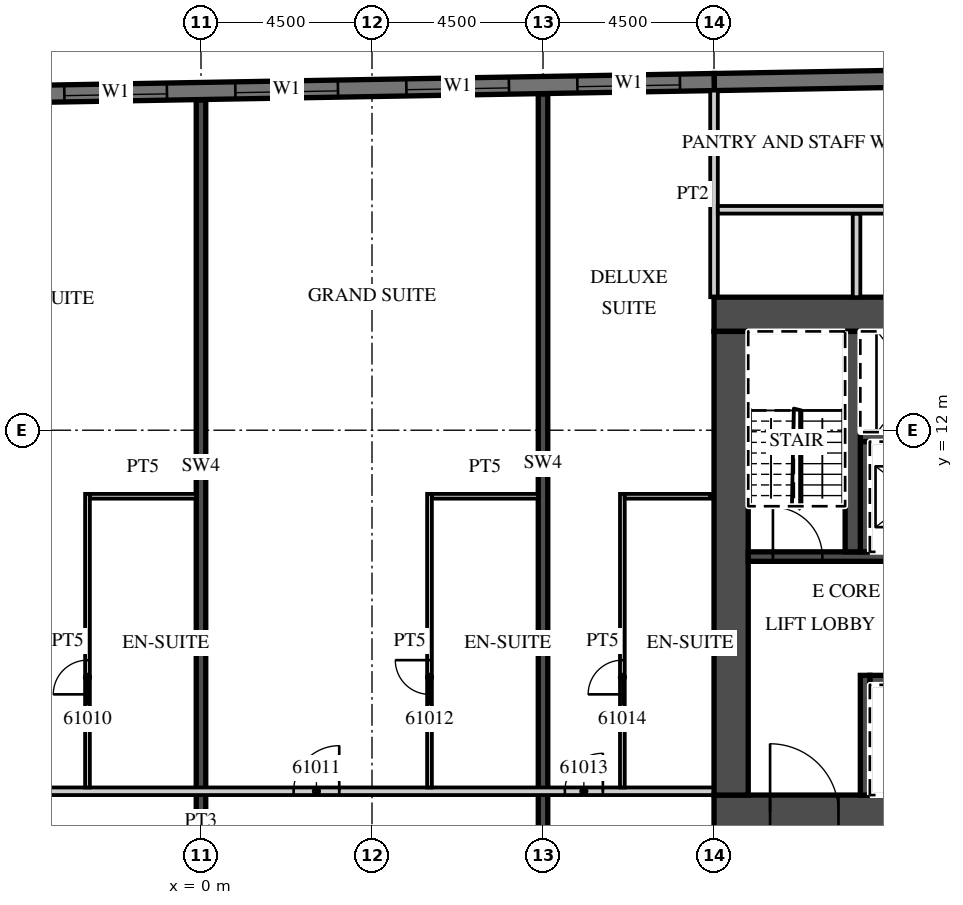
"""IFC4 building model, lengths in metres.
Left out: names, types, materials, properties, quantities, classifications, styles, units other than length and angle.
Written with IfcOpenShell. Run it as: python <this file> out.ifc"""

import sys

from ifc_helpers import new_model, si_unit, direction, frame, frame_2d, origin, place, context, subcontext, project, spatial, rectangle, extrude, element, fill, save


model = new_model("IFC4")
c1 = context("Model", 3, precision=1e-05, world=origin(), true_north=direction((0.0, 1.0)))
c2 = subcontext(c1, "Body", "Model", "MODEL_VIEW")
j1 = project(units=[si_unit("LENGTHUNIT", "METRE"), si_unit("PLANEANGLEUNIT", "RADIAN")], contexts=[c1])
p1 = place(None, origin())
s1 = spatial("IfcSite", under=j1, at=p1, CompositionType="ELEMENT")
p2 = place(p1, origin())
s2 = spatial("IfcBuilding", under=s1, at=p2, CompositionType="ELEMENT")
p3 = place(p2, frame((0.0, 0.0, 247.4)))
s3 = spatial("IfcBuildingStorey", under=s2, at=p3, CompositionType="ELEMENT", Elevation=247.4)
p4 = place(p3, frame((0.0, 1.4, 0.0), z_axis=(0.0, 0.0, 1.0), x_axis=(0.0, 1.0, 0.0)))
e1 = element("IfcWall", 1, at=p4, inside=s3, PredefinedType="SHEAR", context=c2, shape_type="SweptSolid", body=[
    extrude(rectangle(XDim=19.289, YDim=0.25, at=frame_2d((9.644, 0.0))), origin(), (0.0, 0.0, 1.0), 3.3),
])
p5 = place(p3, frame((9.0, 1.4, 0.0), z_axis=(0.0, 0.0, 1.0), x_axis=(0.0, 1.0, 0.0)))
e2 = element("IfcWall", 2, at=p5, inside=s3, PredefinedType="SHEAR", context=c2, shape_type="SweptSolid", body=[
    extrude(rectangle(XDim=19.446, YDim=0.25, at=frame_2d((9.723, 0.0))), origin(), (0.0, 0.0, 1.0), 3.3),
])
p6 = place(p3, frame((31.504, 21.476, 0.0), z_axis=(0.0, 0.0, 1.0), x_axis=(-0.999847677887, -0.017453395744, 0.0)))
e3 = element("IfcWall", 3, at=p6, inside=s3, PredefinedType="SOLIDWALL", context=c2, shape_type="SweptSolid", body=[
    extrude(rectangle(XDim=18.003, YDim=0.45, at=frame_2d((9.001, 0.0))), origin(), (0.0, 0.0, 1.0), 3.02),
])
p7 = place(p3, frame((13.504, 21.161, 0.0), z_axis=(0.0, 0.0, 1.0), x_axis=(-0.999847763257, -0.017448504532, 0.0)))
e4 = element("IfcWall", 4, at=p7, inside=s3, PredefinedType="SOLIDWALL", context=c2, shape_type="SweptSolid", body=[
    extrude(rectangle(XDim=46.859, YDim=0.45, at=frame_2d((23.43, 0.0))), origin(), (0.0, 0.0, 1.0), 3.02),
])
p8 = place(p7, frame((0.9, 0.0, 0.45)))
e5 = element("IfcOpeningElement", 5, at=p8, cuts=e4, PredefinedType="OPENING", context=c2, shape_type="SweptSolid", body=[
    extrude(rectangle(XDim=2.7, YDim=2.25, at=frame_2d((1.35, 1.125))), frame((0.0, 0.235, 0.0), z_axis=(0.0, -1.0, 0.0), x_axis=(1.0, 0.0, 0.0)), (0.0, 0.0, 1.0), 0.47),
])
p9 = place(p7, frame((5.401, 0.0, 0.45)))
e6 = element("IfcOpeningElement", 6, at=p9, cuts=e4, PredefinedType="OPENING", context=c2, shape_type="SweptSolid", body=[
    extrude(rectangle(XDim=2.7, YDim=2.25, at=frame_2d((1.35, 1.125))), frame((0.0, 0.235, 0.0), z_axis=(0.0, -1.0, 0.0), x_axis=(1.0, 0.0, 0.0)), (0.0, 0.0, 1.0), 0.47),
])
p10 = place(p7, frame((9.902, 0.0, 0.45)))
e7 = element("IfcOpeningElement", 7, at=p10, cuts=e4, PredefinedType="OPENING", context=c2, shape_type="SweptSolid", body=[
    extrude(rectangle(XDim=2.7, YDim=2.25, at=frame_2d((1.35, 1.125))), frame((0.0, 0.235, 0.0), z_axis=(0.0, -1.0, 0.0), x_axis=(1.0, 0.0, 0.0)), (0.0, 0.0, 1.0), 0.47),
])
p11 = place(p7, frame((14.402, 0.0, 0.45)))
e8 = element("IfcOpeningElement", 8, at=p11, cuts=e4, PredefinedType="OPENING", context=c2, shape_type="SweptSolid", body=[
    extrude(rectangle(XDim=2.7, YDim=2.25, at=frame_2d((1.35, 1.125))), frame((0.0, 0.235, 0.0), z_axis=(0.0, -1.0, 0.0), x_axis=(1.0, 0.0, 0.0)), (0.0, 0.0, 1.0), 0.47),
])
p12 = place(p7, frame((18.903, 0.0, 0.45)))
e9 = element("IfcOpeningElement", 9, at=p12, cuts=e4, PredefinedType="OPENING", context=c2, shape_type="SweptSolid", body=[
    extrude(rectangle(XDim=2.7, YDim=2.25, at=frame_2d((1.35, 1.125))), frame((0.0, 0.235, 0.0), z_axis=(0.0, -1.0, 0.0), x_axis=(1.0, 0.0, 0.0)), (0.0, 0.0, 1.0), 0.47),
])
p13 = place(p7, frame((23.404, 0.0, 0.45)))
e10 = element("IfcOpeningElement", 10, at=p13, cuts=e4, PredefinedType="OPENING", context=c2, shape_type="SweptSolid", body=[
    extrude(rectangle(XDim=2.7, YDim=2.25, at=frame_2d((1.35, 1.125))), frame((0.0, 0.235, 0.0), z_axis=(0.0, -1.0, 0.0), x_axis=(1.0, 0.0, 0.0)), (0.0, 0.0, 1.0), 0.47),
])
p14 = place(p7, frame((27.904, 0.0, 0.45)))
e11 = element("IfcOpeningElement", 11, at=p14, cuts=e4, PredefinedType="OPENING", context=c2, shape_type="SweptSolid", body=[
    extrude(rectangle(XDim=2.7, YDim=2.25, at=frame_2d((1.35, 1.125))), frame((0.0, 0.235, 0.0), z_axis=(0.0, -1.0, 0.0), x_axis=(1.0, 0.0, 0.0)), (0.0, 0.0, 1.0), 0.47),
])
p15 = place(p7, frame((32.405, 0.0, 0.45)))
e12 = element("IfcOpeningElement", 12, at=p15, cuts=e4, PredefinedType="OPENING", context=c2, shape_type="SweptSolid", body=[
    extrude(rectangle(XDim=2.7, YDim=2.25, at=frame_2d((1.35, 1.125))), frame((0.0, 0.235, 0.0), z_axis=(0.0, -1.0, 0.0), x_axis=(1.0, 0.0, 0.0)), (0.0, 0.0, 1.0), 0.47),
])
p16 = place(p7, frame((36.906, 0.0, 0.45)))
e13 = element("IfcOpeningElement", 13, at=p16, cuts=e4, PredefinedType="OPENING", context=c2, shape_type="SweptSolid", body=[
    extrude(rectangle(XDim=2.7, YDim=2.25, at=frame_2d((1.35, 1.125))), frame((0.0, 0.235, 0.0), z_axis=(0.0, -1.0, 0.0), x_axis=(1.0, 0.0, 0.0)), (0.0, 0.0, 1.0), 0.47),
])
p17 = place(p7, frame((41.406, 0.0, 0.45)))
e14 = element("IfcOpeningElement", 14, at=p17, cuts=e4, PredefinedType="OPENING", context=c2, shape_type="SweptSolid", body=[
    extrude(rectangle(XDim=2.7, YDim=2.25, at=frame_2d((1.35, 1.125))), frame((0.0, 0.235, 0.0), z_axis=(0.0, -1.0, 0.0), x_axis=(1.0, 0.0, 0.0)), (0.0, 0.0, 1.0), 0.47),
])
p18 = place(p3, frame((13.5, 15.5, 0.0), z_axis=(0.0, 0.0, 1.0), x_axis=(0.0, 1.0, 0.0)))
e15 = element("IfcWall", 15, at=p18, inside=s3, PredefinedType="PARTITIONING", context=c2, shape_type="SweptSolid", body=[
    extrude(rectangle(XDim=5.436, YDim=0.2, at=frame_2d((2.718, 0.0))), origin(), (0.0, 0.0, 1.0), 3.02),
])
p19 = place(p3, frame((-13.5, 2.5, 0.0), z_axis=(0.0, 0.0, 1.0), x_axis=(1.0, 0.0, 0.0)))
e16 = element("IfcWall", 16, at=p19, inside=s3, PredefinedType="PARTITIONING", context=c2, shape_type="SweptSolid", body=[
    extrude(rectangle(XDim=27.0, YDim=0.2, at=frame_2d((13.5, 0.0))), origin(), (0.0, 0.0, 1.0), 3.02),
])
p20 = place(p19, frame((0.575, 0.0, 0.0)))
e17 = element("IfcOpeningElement", 17, at=p20, cuts=e16, PredefinedType="OPENING", context=c2, shape_type="SweptSolid", body=[
    extrude(rectangle(XDim=1.0, YDim=2.1, at=frame_2d((0.5, 1.05))), frame((0.0, 0.11, 0.0), z_axis=(0.0, -1.0, 0.0), x_axis=(1.0, 0.0, 0.0)), (0.0, 0.0, 1.0), 0.22),
])
p21 = place(p19, frame((6.938, 0.0, 0.0)))
e18 = element("IfcOpeningElement", 18, at=p21, cuts=e16, PredefinedType="OPENING", context=c2, shape_type="SweptSolid", body=[
    extrude(rectangle(XDim=1.2, YDim=2.1, at=frame_2d((0.6, 1.05))), frame((0.0, 0.11, 0.0), z_axis=(0.0, -1.0, 0.0), x_axis=(1.0, 0.0, 0.0)), (0.0, 0.0, 1.0), 0.22),
])
p22 = place(p19, frame((15.938, 0.0, 0.0)))
e19 = element("IfcOpeningElement", 19, at=p22, cuts=e16, PredefinedType="OPENING", context=c2, shape_type="SweptSolid", body=[
    extrude(rectangle(XDim=1.2, YDim=2.1, at=frame_2d((0.6, 1.05))), frame((0.0, 0.11, 0.0), z_axis=(0.0, -1.0, 0.0), x_axis=(1.0, 0.0, 0.0)), (0.0, 0.0, 1.0), 0.22),
])
p23 = place(p19, frame((23.075, 0.0, 0.0)))
e20 = element("IfcOpeningElement", 20, at=p23, cuts=e16, PredefinedType="OPENING", context=c2, shape_type="SweptSolid", body=[
    extrude(rectangle(XDim=1.0, YDim=2.1, at=frame_2d((0.5, 1.05))), frame((0.0, 0.11, 0.0), z_axis=(0.0, -1.0, 0.0), x_axis=(1.0, 0.0, 0.0)), (0.0, 0.0, 1.0), 0.22),
])
p24 = place(p3, frame((-2.987, 2.6, 0.0), z_axis=(0.0, 0.0, 1.0), x_axis=(0.0, 1.0, 0.0)))
e21 = element("IfcWall", 21, at=p24, inside=s3, PredefinedType="PARTITIONING", context=c2, shape_type="SweptSolid", body=[
    extrude(rectangle(XDim=7.725, YDim=0.125, at=frame_2d((3.862, 0.0))), origin(), (0.0, 0.0, 1.0), 3.02),
])
p25 = place(p24, frame((2.45, 0.0, 0.0)))
e22 = element("IfcOpeningElement", 22, at=p25, cuts=e21, PredefinedType="OPENING", context=c2, shape_type="SweptSolid", body=[
    extrude(rectangle(XDim=0.9, YDim=2.1, at=frame_2d((0.45, 1.05))), frame((0.0, 0.073, 0.0), z_axis=(0.0, -1.0, 0.0), x_axis=(1.0, 0.0, 0.0)), (0.0, 0.0, 1.0), 0.145),
])
p26 = place(p3, frame((-2.925, 10.262, 0.0), z_axis=(0.0, 0.0, 1.0), x_axis=(1.0, 0.0, 0.0)))
e23 = element("IfcWall", 23, at=p26, inside=s3, PredefinedType="PARTITIONING", context=c2, shape_type="SweptSolid", body=[
    extrude(rectangle(XDim=2.8, YDim=0.125, at=frame_2d((1.4, 0.0))), origin(), (0.0, 0.0, 1.0), 3.02),
])
p27 = place(p3, frame((6.013, 2.6, 0.0), z_axis=(0.0, 0.0, 1.0), x_axis=(0.0, 1.0, 0.0)))
e24 = element("IfcWall", 24, at=p27, inside=s3, PredefinedType="PARTITIONING", context=c2, shape_type="SweptSolid", body=[
    extrude(rectangle(XDim=7.725, YDim=0.125, at=frame_2d((3.862, 0.0))), origin(), (0.0, 0.0, 1.0), 3.02),
])
p28 = place(p27, frame((2.45, 0.0, 0.0)))
e25 = element("IfcOpeningElement", 25, at=p28, cuts=e24, PredefinedType="OPENING", context=c2, shape_type="SweptSolid", body=[
    extrude(rectangle(XDim=0.9, YDim=2.1, at=frame_2d((0.45, 1.05))), frame((0.0, 0.073, 0.0), z_axis=(0.0, -1.0, 0.0), x_axis=(1.0, 0.0, 0.0)), (0.0, 0.0, 1.0), 0.145),
])
p29 = place(p3, frame((6.075, 10.262, 0.0), z_axis=(0.0, 0.0, 1.0), x_axis=(1.0, 0.0, 0.0)))
e26 = element("IfcWall", 26, at=p29, inside=s3, PredefinedType="PARTITIONING", context=c2, shape_type="SweptSolid", body=[
    extrude(rectangle(XDim=2.8, YDim=0.125, at=frame_2d((1.4, 0.0))), origin(), (0.0, 0.0, 1.0), 3.02),
])
p30 = place(p3, frame((11.088, 2.6, 0.0), z_axis=(0.0, 0.0, 1.0), x_axis=(0.0, 1.0, 0.0)))
e27 = element("IfcWall", 27, at=p30, inside=s3, PredefinedType="PARTITIONING", context=c2, shape_type="SweptSolid", body=[
    extrude(rectangle(XDim=7.725, YDim=0.125, at=frame_2d((3.862, 0.0))), origin(), (0.0, 0.0, 1.0), 3.02),
])
p31 = place(p30, frame((2.45, 0.0, 0.0)))
e28 = element("IfcOpeningElement", 28, at=p31, cuts=e27, PredefinedType="OPENING", context=c2, shape_type="SweptSolid", body=[
    extrude(rectangle(XDim=0.9, YDim=2.1, at=frame_2d((0.45, 1.05))), frame((0.0, 0.073, 0.0), z_axis=(0.0, -1.0, 0.0), x_axis=(1.0, 0.0, 0.0)), (0.0, 0.0, 1.0), 0.145),
])
p32 = place(p3, frame((11.15, 10.262, 0.0), z_axis=(0.0, 0.0, 1.0), x_axis=(1.0, 0.0, 0.0)))
e29 = element("IfcWall", 29, at=p32, inside=s3, PredefinedType="PARTITIONING", context=c2, shape_type="SweptSolid", body=[
    extrude(rectangle(XDim=2.25, YDim=0.125, at=frame_2d((1.125, 0.0))), origin(), (0.0, 0.0, 1.0), 3.02),
])
p33 = place(p3, frame((13.5, 1.95, 0.0), z_axis=(0.0, 0.0, 1.0), x_axis=(1.0, 0.0, 0.0)))
e30 = element("IfcWall", 30, at=p33, inside=s3, PredefinedType="SHEAR", context=c2, shape_type="SweptSolid", body=[
    extrude(rectangle(XDim=18.0, YDim=0.9, at=frame_2d((9.0, 0.0))), origin(), (0.0, 0.0, 1.0), 3.02),
])
p34 = place(p33, frame((1.475, 0.0, 0.0)))
e31 = element("IfcOpeningElement", 31, at=p34, cuts=e30, PredefinedType="OPENING", context=c2, shape_type="SweptSolid", body=[
    extrude(rectangle(XDim=1.8, YDim=2.1, at=frame_2d((0.9, 1.05))), frame((0.0, 0.46, 0.0), z_axis=(0.0, -1.0, 0.0), x_axis=(1.0, 0.0, 0.0)), (0.0, 0.0, 1.0), 0.92),
])
p35 = place(p3, frame((13.5, 15.05, 0.0), z_axis=(0.0, 0.0, 1.0), x_axis=(1.0, 0.0, 0.0)))
e32 = element("IfcWall", 32, at=p35, inside=s3, PredefinedType="SHEAR", context=c2, shape_type="SweptSolid", body=[
    extrude(rectangle(XDim=6.8, YDim=0.9, at=frame_2d((3.4, 0.0))), origin(), (0.0, 0.0, 1.0), 3.02),
])
p36 = place(p35, frame((4.725, 0.0, 0.0)))
e33 = element("IfcOpeningElement", 33, at=p36, cuts=e32, PredefinedType="OPENING", context=c2, shape_type="SweptSolid", body=[
    extrude(rectangle(XDim=1.2, YDim=2.1, at=frame_2d((0.6, 1.05))), frame((0.0, 0.46, 0.0), z_axis=(0.0, -1.0, 0.0), x_axis=(1.0, 0.0, 0.0)), (0.0, 0.0, 1.0), 0.92),
])
p37 = place(p3, frame((13.95, 2.4, 0.0), z_axis=(0.0, 0.0, 1.0), x_axis=(0.0, 1.0, 0.0)))
e34 = element("IfcWall", 34, at=p37, inside=s3, PredefinedType="SHEAR", context=c2, shape_type="SweptSolid", body=[
    extrude(rectangle(XDim=12.2, YDim=0.9, at=frame_2d((6.1, 0.0))), origin(), (0.0, 0.0, 1.0), 3.02),
])
p38 = place(p3, frame((17.6, 5.425, 0.0), z_axis=(0.0, 0.0, 1.0), x_axis=(1.0, 0.0, 0.0)))
e35 = element("IfcWall", 35, at=p38, inside=s3, PredefinedType="SHEAR", context=c2, shape_type="SweptSolid", body=[
    extrude(rectangle(XDim=13.0, YDim=0.25, at=frame_2d((6.5, 0.0))), origin(), (0.0, 0.0, 1.0), 3.02),
])
p39 = place(p38, frame((8.475, 0.0, 0.0)))
e36 = element("IfcOpeningElement", 36, at=p39, cuts=e35, PredefinedType="OPENING", context=c2, shape_type="SweptSolid", body=[
    extrude(rectangle(XDim=1.2, YDim=2.1, at=frame_2d((0.6, 1.05))), frame((0.0, 0.135, 0.0), z_axis=(0.0, -1.0, 0.0), x_axis=(1.0, 0.0, 0.0)), (0.0, 0.0, 1.0), 0.27),
])
p40 = place(p38, frame((5.875, 0.0, 0.0)))
e37 = element("IfcOpeningElement", 37, at=p40, cuts=e35, PredefinedType="OPENING", context=c2, shape_type="SweptSolid", body=[
    extrude(rectangle(XDim=1.2, YDim=2.1, at=frame_2d((0.6, 1.05))), frame((0.0, 0.135, 0.0), z_axis=(0.0, -1.0, 0.0), x_axis=(1.0, 0.0, 0.0)), (0.0, 0.0, 1.0), 0.27),
])
p41 = place(p3, frame((17.475, 2.4, 0.0), z_axis=(0.0, 0.0, 1.0), x_axis=(0.0, 1.0, 0.0)))
e38 = element("IfcWall", 38, at=p41, inside=s3, PredefinedType="SHEAR", context=c2, shape_type="SweptSolid", body=[
    extrude(rectangle(XDim=3.15, YDim=0.25, at=frame_2d((1.575, 0.0))), origin(), (0.0, 0.0, 1.0), 3.02),
])
p42 = place(p3, frame((14.4, 8.675, 0.0), z_axis=(0.0, 0.0, 1.0), x_axis=(1.0, 0.0, 0.0)))
e39 = element("IfcWall", 39, at=p42, inside=s3, PredefinedType="SHEAR", context=c2, shape_type="SweptSolid", body=[
    extrude(rectangle(XDim=16.2, YDim=0.25, at=frame_2d((8.1, 0.0))), origin(), (0.0, 0.0, 1.0), 3.02),
])
p43 = place(p42, frame((6.45, 0.0, 0.0)))
e40 = element("IfcOpeningElement", 40, at=p43, cuts=e39, PredefinedType="OPENING", context=c2, shape_type="SweptSolid", body=[
    extrude(rectangle(XDim=1.2, YDim=2.1, at=frame_2d((0.6, 1.05))), frame((0.0, 0.135, 0.0), z_axis=(0.0, -1.0, 0.0), x_axis=(1.0, 0.0, 0.0)), (0.0, 0.0, 1.0), 0.27),
])
p44 = place(p42, frame((3.8, 0.0, 0.0)))
e41 = element("IfcOpeningElement", 41, at=p44, cuts=e39, PredefinedType="OPENING", context=c2, shape_type="SweptSolid", body=[
    extrude(rectangle(XDim=1.2, YDim=2.1, at=frame_2d((0.6, 1.05))), frame((0.0, 0.135, 0.0), z_axis=(0.0, -1.0, 0.0), x_axis=(1.0, 0.0, 0.0)), (0.0, 0.0, 1.0), 0.27),
])
p45 = place(p42, frame((0.65, 0.0, 0.0)))
e42 = element("IfcOpeningElement", 42, at=p45, cuts=e39, PredefinedType="OPENING", context=c2, shape_type="SweptSolid", body=[
    extrude(rectangle(XDim=1.3, YDim=2.1, at=frame_2d((0.65, 1.05))), frame((0.0, 0.135, 0.0), z_axis=(0.0, -1.0, 0.0), x_axis=(1.0, 0.0, 0.0)), (0.0, 0.0, 1.0), 0.27),
])
p46 = place(p42, frame((13.913, 0.0, 0.0)))
e43 = element("IfcOpeningElement", 43, at=p46, cuts=e39, PredefinedType="OPENING", context=c2, shape_type="SweptSolid", body=[
    extrude(rectangle(XDim=1.0, YDim=2.1, at=frame_2d((0.5, 1.05))), frame((0.0, 0.135, 0.0), z_axis=(0.0, -1.0, 0.0), x_axis=(1.0, 0.0, 0.0)), (0.0, 0.0, 1.0), 0.27),
])
p47 = place(p42, frame((9.938, 0.0, 0.0)))
e44 = element("IfcOpeningElement", 44, at=p47, cuts=e39, PredefinedType="OPENING", context=c2, shape_type="SweptSolid", body=[
    extrude(rectangle(XDim=1.0, YDim=2.1, at=frame_2d((0.5, 1.05))), frame((0.0, 0.135, 0.0), z_axis=(0.0, -1.0, 0.0), x_axis=(1.0, 0.0, 0.0)), (0.0, 0.0, 1.0), 0.27),
])
p48 = place(p3, frame((17.35, 11.825, 0.0), z_axis=(0.0, 0.0, 1.0), x_axis=(1.0, 0.0, 0.0)))
e45 = element("IfcWall", 45, at=p48, inside=s3, PredefinedType="SHEAR", context=c2, shape_type="SweptSolid", body=[
    extrude(rectangle(XDim=13.25, YDim=0.25, at=frame_2d((6.625, 0.0))), origin(), (0.0, 0.0, 1.0), 3.02),
])
p49 = place(p3, frame((17.475, 8.8, 0.0), z_axis=(0.0, 0.0, 1.0), x_axis=(0.0, 1.0, 0.0)))
e46 = element("IfcWall", 46, at=p49, inside=s3, PredefinedType="SHEAR", context=c2, shape_type="SweptSolid", body=[
    extrude(rectangle(XDim=2.9, YDim=0.25, at=frame_2d((1.45, 0.0))), origin(), (0.0, 0.0, 1.0), 3.02),
])
p50 = place(p3, frame((17.15, 8.8, 0.0), z_axis=(0.0, 0.0, 1.0), x_axis=(0.0, 1.0, 0.0)))
e47 = element("IfcWall", 47, at=p50, inside=s3, PredefinedType="SHEAR", context=c2, shape_type="SweptSolid", body=[
    extrude(rectangle(XDim=5.8, YDim=0.4, at=frame_2d((2.9, 0.0))), origin(), (0.0, 0.0, 1.0), 3.02),
])
p51 = place(p3, frame((17.25, 15.5, 0.0), z_axis=(0.0, 0.0, 1.0), x_axis=(0.0, 1.0, 0.0)))
e48 = element("IfcWall", 48, at=p51, inside=s3, PredefinedType="PARTITIONING", context=c2, shape_type="SweptSolid", body=[
    extrude(rectangle(XDim=2.2, YDim=0.2, at=frame_2d((1.1, 0.0))), origin(), (0.0, 0.0, 1.0), 3.02),
])
p52 = place(p3, frame((13.6, 17.8, 0.0), z_axis=(0.0, 0.0, 1.0), x_axis=(1.0, 0.0, 0.0)))
e49 = element("IfcWall", 49, at=p52, inside=s3, PredefinedType="PARTITIONING", context=c2, shape_type="SweptSolid", body=[
    extrude(rectangle(XDim=28.657, YDim=0.2, at=frame_2d((14.329, 0.0))), origin(), (0.0, 0.0, 1.0), 3.02),
])
p53 = place(p52, frame((15.012, 0.0, 0.0)))
e50 = element("IfcOpeningElement", 50, at=p53, cuts=e49, PredefinedType="OPENING", context=c2, shape_type="SweptSolid", body=[
    extrude(rectangle(XDim=0.9, YDim=2.1, at=frame_2d((0.45, 1.05))), frame((0.0, 0.11, 0.0), z_axis=(0.0, -1.0, 0.0), x_axis=(1.0, 0.0, 0.0)), (0.0, 0.0, 1.0), 0.22),
])
p54 = place(p52, frame((6.712, 0.0, 0.0)))
e51 = element("IfcOpeningElement", 51, at=p54, cuts=e49, PredefinedType="OPENING", context=c2, shape_type="SweptSolid", body=[
    extrude(rectangle(XDim=0.9, YDim=2.1, at=frame_2d((0.45, 1.05))), frame((0.0, 0.11, 0.0), z_axis=(0.0, -1.0, 0.0), x_axis=(1.0, 0.0, 0.0)), (0.0, 0.0, 1.0), 0.22),
])
p55 = place(p8, origin())
e52 = element("IfcWindow", 52, at=p55, inside=s3, PartitioningType="SINGLE_PANEL", PredefinedType="WINDOW", context=c2, shape_type="SweptSolid", body=[
    extrude(rectangle(XDim=2.7, YDim=2.25, at=frame_2d((1.35, 1.125))), frame((0.0, 0.09, 0.0), z_axis=(0.0, -1.0, 0.0), x_axis=(1.0, 0.0, 0.0)), (0.0, 0.0, 1.0), 0.06),
])
fill(e5, e52)
p56 = place(p9, origin())
e53 = element("IfcWindow", 53, at=p56, inside=s3, PartitioningType="SINGLE_PANEL", PredefinedType="WINDOW", context=c2, shape_type="SweptSolid", body=[
    extrude(rectangle(XDim=2.7, YDim=2.25, at=frame_2d((1.35, 1.125))), frame((0.0, 0.09, 0.0), z_axis=(0.0, -1.0, 0.0), x_axis=(1.0, 0.0, 0.0)), (0.0, 0.0, 1.0), 0.06),
])
fill(e6, e53)
p57 = place(p10, origin())
e54 = element("IfcWindow", 54, at=p57, inside=s3, PartitioningType="SINGLE_PANEL", PredefinedType="WINDOW", context=c2, shape_type="SweptSolid", body=[
    extrude(rectangle(XDim=2.7, YDim=2.25, at=frame_2d((1.35, 1.125))), frame((0.0, 0.09, 0.0), z_axis=(0.0, -1.0, 0.0), x_axis=(1.0, 0.0, 0.0)), (0.0, 0.0, 1.0), 0.06),
])
fill(e7, e54)
p58 = place(p11, origin())
e55 = element("IfcWindow", 55, at=p58, inside=s3, PartitioningType="SINGLE_PANEL", PredefinedType="WINDOW", context=c2, shape_type="SweptSolid", body=[
    extrude(rectangle(XDim=2.7, YDim=2.25, at=frame_2d((1.35, 1.125))), frame((0.0, 0.09, 0.0), z_axis=(0.0, -1.0, 0.0), x_axis=(1.0, 0.0, 0.0)), (0.0, 0.0, 1.0), 0.06),
])
fill(e8, e55)
p59 = place(p25, origin())
e56 = element("IfcDoor", 56, at=p59, inside=s3, OperationType="SINGLE_SWING_LEFT", PredefinedType="DOOR", context=c2, shape_type="SweptSolid", body=[
    extrude(rectangle(XDim=0.9, YDim=2.1, at=frame_2d((0.45, 1.05))), frame((0.0, 0.025, 0.0), z_axis=(0.0, -1.0, 0.0), x_axis=(1.0, 0.0, 0.0)), (0.0, 0.0, 1.0), 0.05),
])
fill(e22, e56)
p60 = place(p22, origin())
e57 = element("IfcDoor", 57, at=p60, inside=s3, OperationType="SINGLE_SWING_RIGHT", PredefinedType="DOOR", context=c2, shape_type="SweptSolid", body=[
    extrude(rectangle(XDim=1.2, YDim=2.1, at=frame_2d((0.6, 1.05))), frame((0.0, 0.025, 0.0), z_axis=(0.0, -1.0, 0.0), x_axis=(1.0, 0.0, 0.0)), (0.0, 0.0, 1.0), 0.05),
])
fill(e19, e57)
p61 = place(p28, origin())
e58 = element("IfcDoor", 58, at=p61, inside=s3, OperationType="SINGLE_SWING_RIGHT", PredefinedType="DOOR", context=c2, shape_type="SweptSolid", body=[
    extrude(rectangle(XDim=0.9, YDim=2.1, at=frame_2d((0.45, 1.05))), frame((0.0, 0.025, 0.0), z_axis=(0.0, -1.0, 0.0), x_axis=(1.0, 0.0, 0.0)), (0.0, 0.0, 1.0), 0.05),
])
fill(e25, e58)
p62 = place(p23, origin())
e59 = element("IfcDoor", 59, at=p62, inside=s3, OperationType="SINGLE_SWING_RIGHT", PredefinedType="DOOR", context=c2, shape_type="SweptSolid", body=[
    extrude(rectangle(XDim=1.0, YDim=2.1, at=frame_2d((0.5, 1.05))), frame((0.0, 0.025, 0.0), z_axis=(0.0, -1.0, 0.0), x_axis=(1.0, 0.0, 0.0)), (0.0, 0.0, 1.0), 0.05),
])
fill(e20, e59)
p63 = place(p31, origin())
e60 = element("IfcDoor", 60, at=p63, inside=s3, OperationType="SINGLE_SWING_LEFT", PredefinedType="DOOR", context=c2, shape_type="SweptSolid", body=[
    extrude(rectangle(XDim=0.9, YDim=2.1, at=frame_2d((0.45, 1.05))), frame((0.0, 0.025, 0.0), z_axis=(0.0, -1.0, 0.0), x_axis=(1.0, 0.0, 0.0)), (0.0, 0.0, 1.0), 0.05),
])
fill(e28, e60)
p64 = place(p34, origin())
e61 = element("IfcDoor", 61, at=p64, inside=s3, OperationType="DOUBLE_DOOR_DOUBLE_SWING", PredefinedType="DOOR", context=c2, shape_type="SweptSolid", body=[
    extrude(rectangle(XDim=1.8, YDim=2.1, at=frame_2d((0.9, 1.05))), frame((0.0, 0.025, 0.0), z_axis=(0.0, -1.0, 0.0), x_axis=(1.0, 0.0, 0.0)), (0.0, 0.0, 1.0), 0.05),
])
fill(e31, e61)
p65 = place(p45, origin())
e62 = element("IfcDoor", 62, at=p65, inside=s3, OperationType="SINGLE_SWING_LEFT", PredefinedType="DOOR", context=c2, shape_type="SweptSolid", body=[
    extrude(rectangle(XDim=1.3, YDim=2.1, at=frame_2d((0.65, 1.05))), frame((0.0, 0.025, 0.0), z_axis=(0.0, -1.0, 0.0), x_axis=(1.0, 0.0, 0.0)), (0.0, 0.0, 1.0), 0.05),
])
fill(e42, e62)
save(model, sys.argv[1])
